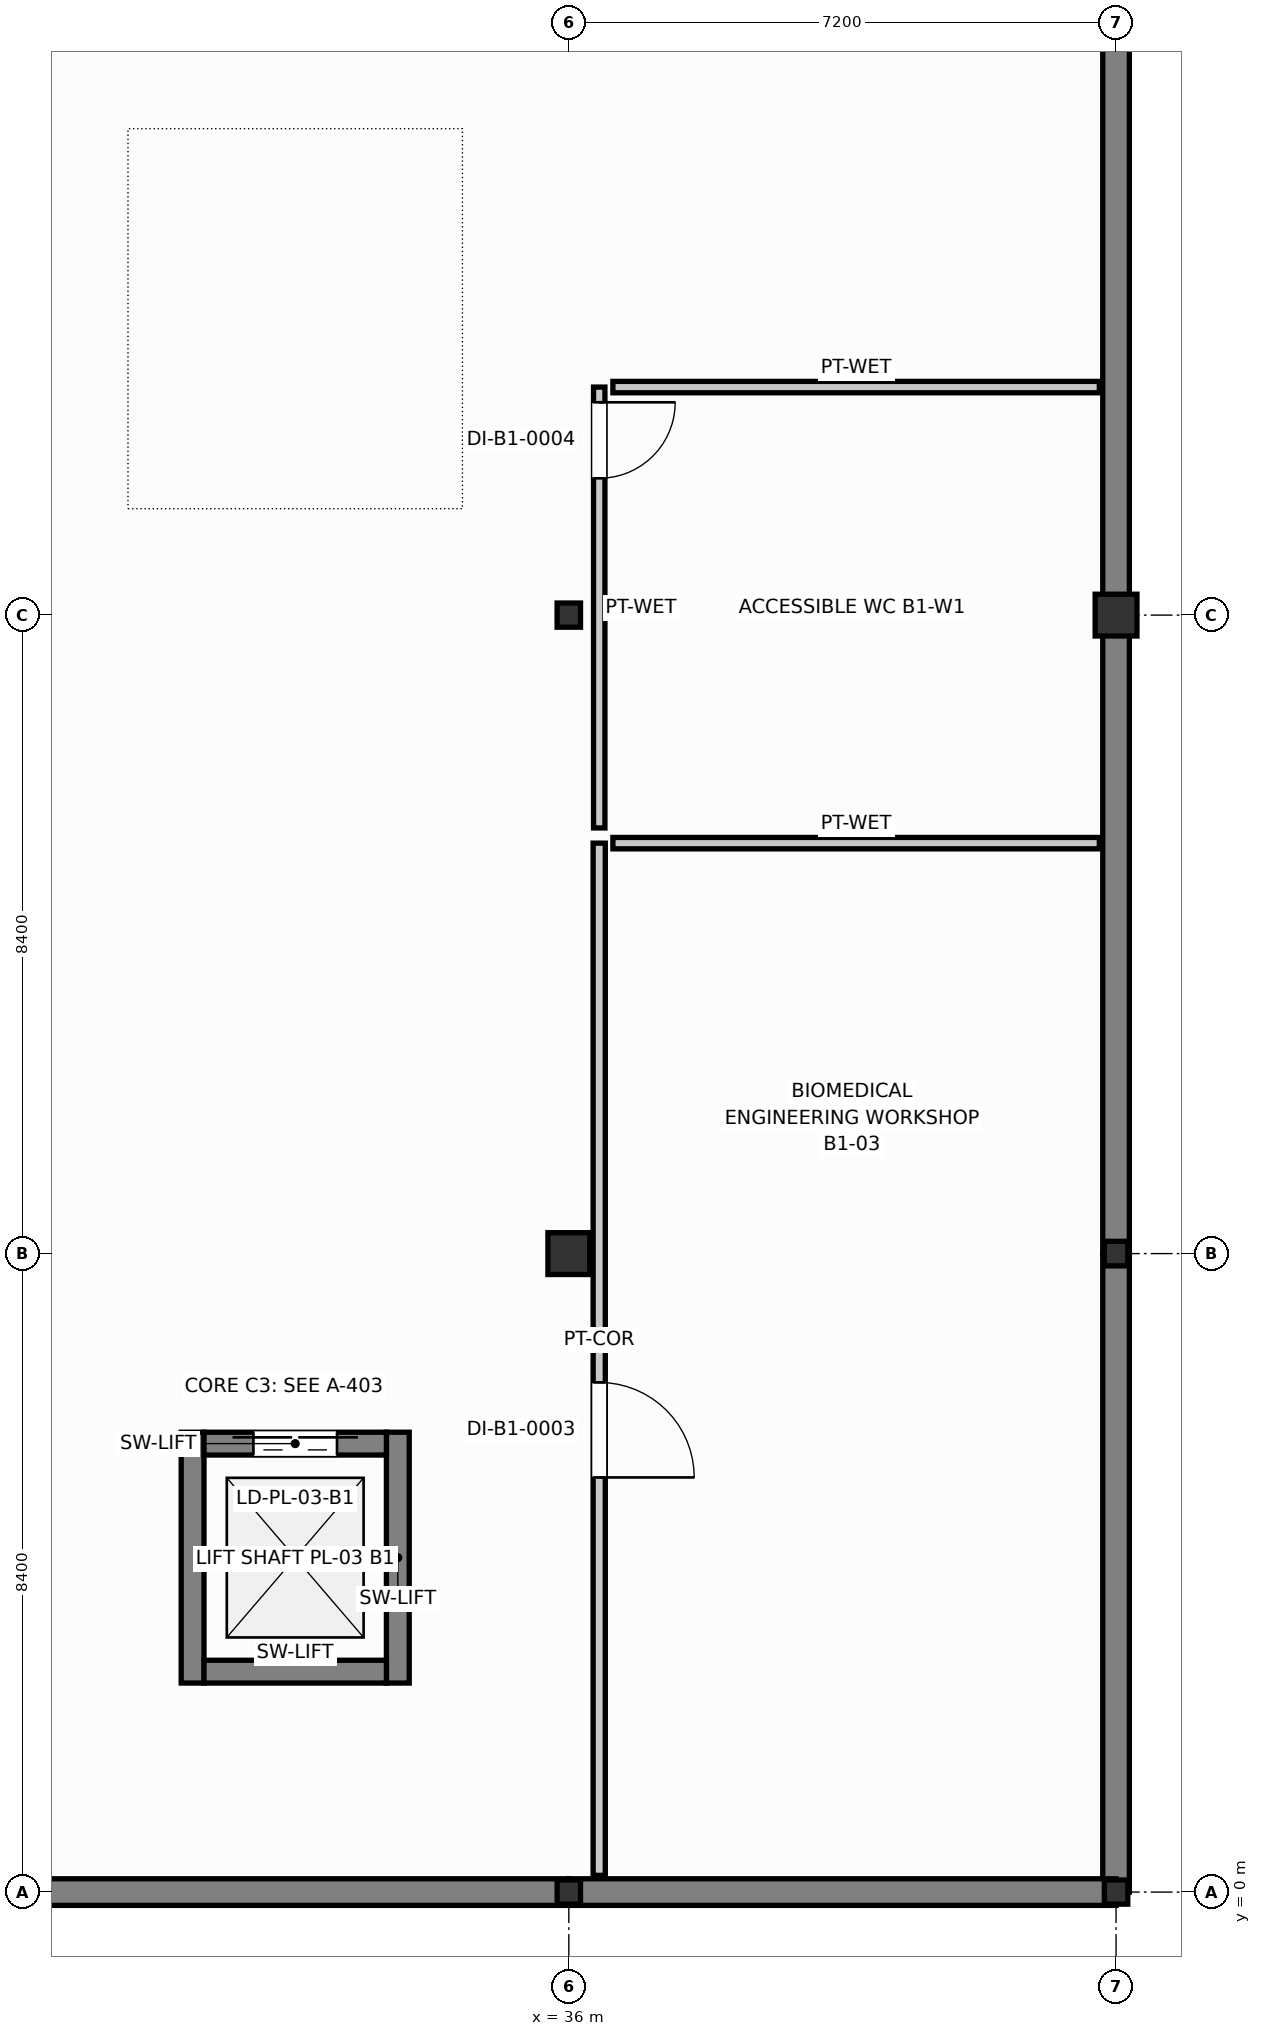
"""IFC4 building model, lengths in metres.
Left out: names, types, materials, properties, quantities, classifications, styles, units other than length and angle.
Written with IfcOpenShell. Run it as: python <this file> out.ifc"""

import sys

from ifc_helpers import new_model, si_unit, direction, frame, frame_2d, origin, origin_2d, place, context, subcontext, project, spatial, rectangle, i_section, extrude, element, fill, save


model = new_model("IFC4")
c1 = context("Model", 3, precision=1e-05, world=origin(), true_north=direction((0.0, 1.0)))
c2 = subcontext(c1, "Body", "Model", "MODEL_VIEW")
j1 = project(units=[si_unit("LENGTHUNIT", "METRE"), si_unit("PLANEANGLEUNIT", "RADIAN")], contexts=[c1])
p1 = place(None, origin())
s1 = spatial("IfcSite", under=j1, at=p1, CompositionType="ELEMENT")
p2 = place(p1, origin())
s2 = spatial("IfcBuilding", under=s1, at=p2, CompositionType="ELEMENT")
p3 = place(p2, frame((0.0, 0.0, -4.2)))
s3 = spatial("IfcBuildingStorey", under=s2, at=p3, CompositionType="ELEMENT", Elevation=-4.2)
p4 = place(p3, frame((43.2, 0.0, 0.0), z_axis=(0.0, 0.0, 1.0), x_axis=(0.0, 1.0, 0.0)))
e1 = element("IfcWall", 1, at=p4, inside=s3, PredefinedType="USERDEFINED", context=c2, shape_type="SweptSolid", body=[
    extrude(rectangle(XDim=8.4, YDim=0.35, at=frame_2d((4.2, 0.0))), origin(), (0.0, 0.0, 1.0), 3.96),
])
p5 = place(p3, frame((43.2, 8.4, 0.0), z_axis=(0.0, 0.0, 1.0), x_axis=(0.0, 1.0, 0.0)))
e2 = element("IfcWall", 2, at=p5, inside=s3, PredefinedType="USERDEFINED", context=c2, shape_type="SweptSolid", body=[
    extrude(rectangle(XDim=8.4, YDim=0.35, at=frame_2d((4.2, 0.0))), origin(), (0.0, 0.0, 1.0), 3.96),
])
p6 = place(p3, frame((43.2, 16.8, 0.0), z_axis=(0.0, 0.0, 1.0), x_axis=(0.0, 1.0, 0.0)))
e3 = element("IfcWall", 3, at=p6, inside=s3, PredefinedType="USERDEFINED", context=c2, shape_type="SweptSolid", body=[
    extrude(rectangle(XDim=8.4, YDim=0.35, at=frame_2d((4.2, 0.0))), origin(), (0.0, 0.0, 1.0), 3.96),
])
for number, where, z_axis, x_axis in (
    (4, (28.8, 0.0, 0.0), (0.0, 0.0, 1.0), (1.0, 0.0, 0.0)),
    (5, (36.0, 0.0, 0.0), (0.0, 0.0, 1.0), (1.0, 0.0, 0.0)),
):
    element("IfcWall", number, at=place(p3, frame(where, z_axis=z_axis, x_axis=x_axis)), inside=s3, PredefinedType="USERDEFINED", context=c2, shape_type="SweptSolid", body=[
        extrude(rectangle(XDim=7.2, YDim=0.35, at=frame_2d((3.6, 0.0))), origin(), (0.0, 0.0, 1.0), 3.96),
    ])
p7 = place(p3, frame((36.0, 0.0, 0.0), z_axis=(0.0, 0.0, 1.0), x_axis=(1.0, 0.0, 0.0)))
e6 = element("IfcColumn", 6, at=p7, inside=s3, PredefinedType="COLUMN", context=c2, shape_type="SweptSolid", body=[
    extrude(i_section(OverallWidth=0.308, OverallDepth=0.318, WebThickness=0.013, FlangeThickness=0.021, FilletRadius=0.016, at=origin_2d()), origin(), (0.0, 0.0, 1.0), 4.2),
])
p8 = place(p3, frame((36.0, 8.4, 0.0), z_axis=(0.0, 0.0, 1.0), x_axis=(1.0, 0.0, 0.0)))
e7 = element("IfcColumn", 7, at=p8, inside=s3, PredefinedType="COLUMN", context=c2, shape_type="SweptSolid", body=[
    extrude(rectangle(XDim=0.55, YDim=0.55, at=origin_2d()), origin(), (0.0, 0.0, 1.0), 4.2),
])
for number, where, z_axis, x_axis in (
    (8, (36.0, 16.8, 0.0), (0.0, 0.0, 1.0), (1.0, 0.0, 0.0)),
    (9, (43.2, 0.0, 0.0), (0.0, 0.0, 1.0), (1.0, 0.0, 0.0)),
):
    element("IfcColumn", number, at=place(p3, frame(where, z_axis=z_axis, x_axis=x_axis)), inside=s3, PredefinedType="COLUMN", context=c2, shape_type="SweptSolid", body=[
        extrude(i_section(OverallWidth=0.308, OverallDepth=0.318, WebThickness=0.013, FlangeThickness=0.021, FilletRadius=0.016, at=origin_2d()), origin(), (0.0, 0.0, 1.0), 4.2),
    ])
p9 = place(p3, frame((43.2, 8.4, 0.0), z_axis=(0.0, 0.0, 1.0), x_axis=(1.0, 0.0, 0.0)))
e10 = element("IfcColumn", 10, at=p9, inside=s3, PredefinedType="COLUMN", context=c2, shape_type="SweptSolid", body=[
    extrude(i_section(OverallWidth=0.309, OverallDepth=0.323, WebThickness=0.014, FlangeThickness=0.023, FilletRadius=0.016, at=origin_2d()), origin(), (0.0, 0.0, 1.0), 4.2),
])
p10 = place(p3, frame((43.2, 16.8, 0.0), z_axis=(0.0, 0.0, 1.0), x_axis=(1.0, 0.0, 0.0)))
e11 = element("IfcColumn", 11, at=p10, inside=s3, PredefinedType="COLUMN", context=c2, shape_type="SweptSolid", body=[
    extrude(rectangle(XDim=0.55, YDim=0.55, at=origin_2d()), origin(), (0.0, 0.0, 1.0), 4.2),
])
for number, where, z_axis, x_axis in (
    (12, (31.05, 2.75, 0.0), (0.0, 0.0, 1.0), (0.0, 1.0, 0.0)),
    (13, (33.75, 2.75, 0.0), (0.0, 0.0, 1.0), (0.0, 1.0, 0.0)),
):
    element("IfcWall", number, at=place(p3, frame(where, z_axis=z_axis, x_axis=x_axis)), inside=s3, PredefinedType="SHEAR", context=c2, shape_type="SweptSolid", body=[
        extrude(rectangle(XDim=3.3, YDim=0.3, at=frame_2d((1.65, 0.0))), origin(), (0.0, 0.0, 1.0), 3.96),
    ])
p11 = place(p3, frame((31.2, 5.9, 0.0), z_axis=(0.0, 0.0, 1.0), x_axis=(1.0, 0.0, 0.0)))
e14 = element("IfcWall", 14, at=p11, inside=s3, PredefinedType="SHEAR", context=c2, shape_type="SweptSolid", body=[
    extrude(rectangle(XDim=2.4, YDim=0.3, at=frame_2d((1.2, 0.0))), origin(), (0.0, 0.0, 1.0), 3.96),
])
p12 = place(p11, frame((0.65, 0.0, 0.0)))
e15 = element("IfcOpeningElement", 15, at=p12, cuts=e14, PredefinedType="OPENING", context=c2, shape_type="SweptSolid", body=[
    extrude(rectangle(XDim=1.1, YDim=2.15, at=frame_2d((0.55, 1.075))), frame((0.0, 0.16, 0.0), z_axis=(0.0, -1.0, 0.0), x_axis=(1.0, 0.0, 0.0)), (0.0, 0.0, 1.0), 0.32),
])
p13 = place(p3, frame((31.2, 2.9, 0.0), z_axis=(0.0, 0.0, 1.0), x_axis=(1.0, 0.0, 0.0)))
e16 = element("IfcWall", 16, at=p13, inside=s3, PredefinedType="SHEAR", context=c2, shape_type="SweptSolid", body=[
    extrude(rectangle(XDim=2.4, YDim=0.3, at=frame_2d((1.2, 0.0))), origin(), (0.0, 0.0, 1.0), 3.96),
])
p14 = place(p3, frame((36.4, 0.22, 0.0), z_axis=(0.0, 0.0, 1.0), x_axis=(0.0, 1.0, 0.0)))
e17 = element("IfcWall", 17, at=p14, inside=s3, PredefinedType="PARTITIONING", context=c2, shape_type="SweptSolid", body=[
    extrude(rectangle(XDim=13.58, YDim=0.16, at=frame_2d((6.79, 0.0))), origin(), (0.0, 0.0, 1.0), 3.408),
])
p15 = place(p14, frame((5.235, 0.0, 0.0)))
e18 = element("IfcOpeningElement", 18, at=p15, cuts=e17, PredefinedType="OPENING", context=c2, shape_type="SweptSolid", body=[
    extrude(rectangle(XDim=1.25, YDim=2.2, at=frame_2d((0.625, 1.1))), frame((0.0, 0.09, 0.0), z_axis=(0.0, -1.0, 0.0), x_axis=(1.0, 0.0, 0.0)), (0.0, 0.0, 1.0), 0.18),
])
p16 = place(p3, frame((36.58, 13.8, 0.0), z_axis=(0.0, 0.0, 1.0), x_axis=(1.0, 0.0, 0.0)))
e19 = element("IfcWall", 19, at=p16, inside=s3, PredefinedType="PLUMBINGWALL", context=c2, shape_type="SweptSolid", body=[
    extrude(rectangle(XDim=6.4, YDim=0.15, at=frame_2d((3.2, 0.0))), origin(), (0.0, 0.0, 1.0), 3.687),
])
p17 = place(p3, frame((36.4, 14.0, 0.0), z_axis=(0.0, 0.0, 1.0), x_axis=(0.0, 1.0, 0.0)))
e20 = element("IfcWall", 20, at=p17, inside=s3, PredefinedType="PLUMBINGWALL", context=c2, shape_type="SweptSolid", body=[
    extrude(rectangle(XDim=5.8, YDim=0.15, at=frame_2d((2.9, 0.0))), origin(), (0.0, 0.0, 1.0), 3.535),
])
p18 = place(p17, frame((4.6, 0.0, 0.0)))
e21 = element("IfcOpeningElement", 21, at=p18, cuts=e20, PredefinedType="OPENING", context=c2, shape_type="SweptSolid", body=[
    extrude(rectangle(XDim=1.0, YDim=2.1, at=frame_2d((0.5, 1.05))), frame((0.0, 0.085, 0.0), z_axis=(0.0, -1.0, 0.0), x_axis=(1.0, 0.0, 0.0)), (0.0, 0.0, 1.0), 0.17),
])
p19 = place(p3, frame((36.58, 19.8, 0.0), z_axis=(0.0, 0.0, 1.0), x_axis=(1.0, 0.0, 0.0)))
e22 = element("IfcWall", 22, at=p19, inside=s3, PredefinedType="PLUMBINGWALL", context=c2, shape_type="SweptSolid", body=[
    extrude(rectangle(XDim=6.4, YDim=0.15, at=frame_2d((3.2, 0.0))), origin(), (0.0, 0.0, 1.0), 3.598),
])
p20 = place(p12, origin())
e23 = element("IfcDoor", 23, at=p20, inside=s3, OperationType="DOUBLE_DOOR_SLIDING", PredefinedType="DOOR", context=c2, shape_type="SweptSolid", body=[
    extrude(rectangle(XDim=1.1, YDim=2.15, at=frame_2d((0.55, 1.075))), frame((0.0, 0.025, 0.0), z_axis=(0.0, -1.0, 0.0), x_axis=(1.0, 0.0, 0.0)), (0.0, 0.0, 1.0), 0.05),
])
fill(e15, e23)
p21 = place(p15, frame((1.25, 0.0, 0.0), z_axis=(0.0, 0.0, 1.0), x_axis=(-1.0, 0.0, 0.0)))
e24 = element("IfcDoor", 24, at=p21, inside=s3, OperationType="SINGLE_SWING_RIGHT", PredefinedType="DOOR", context=c2, shape_type="SweptSolid", body=[
    extrude(rectangle(XDim=1.25, YDim=2.2, at=frame_2d((0.625, 1.1))), frame((0.0, 0.025, 0.0), z_axis=(0.0, -1.0, 0.0), x_axis=(1.0, 0.0, 0.0)), (0.0, 0.0, 1.0), 0.05),
])
fill(e18, e24)
p22 = place(p18, frame((1.0, 0.0, 0.0), z_axis=(0.0, 0.0, 1.0), x_axis=(-1.0, 0.0, 0.0)))
e25 = element("IfcDoor", 25, at=p22, inside=s3, OperationType="SINGLE_SWING_LEFT", PredefinedType="DOOR", context=c2, shape_type="SweptSolid", body=[
    extrude(rectangle(XDim=1.0, YDim=2.1, at=frame_2d((0.5, 1.05))), frame((0.0, 0.025, 0.0), z_axis=(0.0, -1.0, 0.0), x_axis=(1.0, 0.0, 0.0)), (0.0, 0.0, 1.0), 0.05),
])
fill(e21, e25)
save(model, sys.argv[1])
